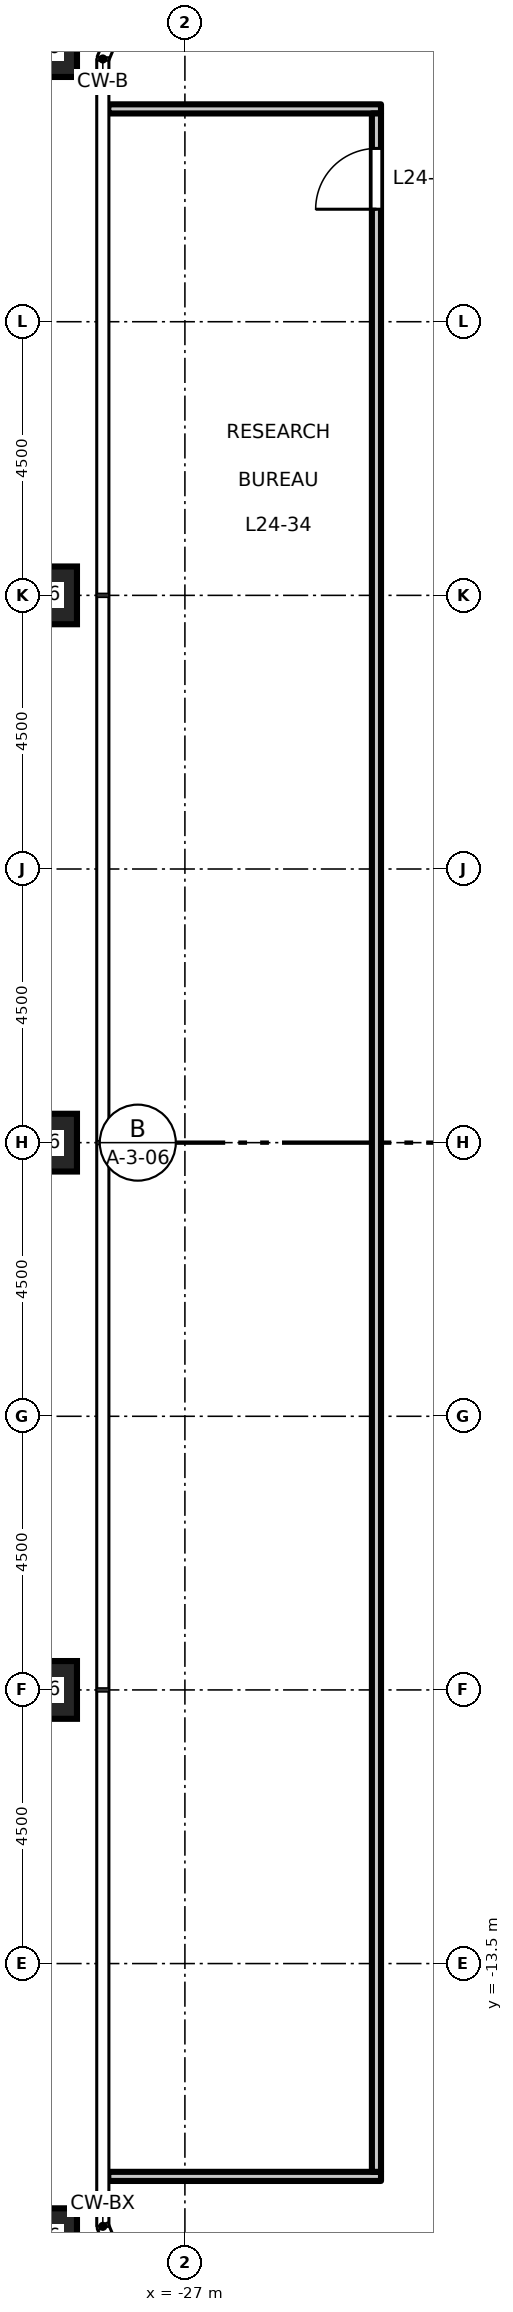
"""IFC4 building model, lengths in metres.
Left out: names, types, materials, properties, quantities, classifications, styles, units other than length and angle.
Written with IfcOpenShell. Run it as: python <this file> out.ifc"""

import sys

from ifc_helpers import new_model, si_unit, direction, frame, frame_2d, origin, origin_2d, place, context, subcontext, project, spatial, rectangle, hollow_rectangle, extrude, element, fill, save


model = new_model("IFC4")
c1 = context("Model", 3, precision=1e-05, world=origin(), true_north=direction((0.0, 1.0)))
c2 = subcontext(c1, "Body", "Model", "MODEL_VIEW")
j1 = project(units=[si_unit("LENGTHUNIT", "METRE"), si_unit("PLANEANGLEUNIT", "RADIAN")], contexts=[c1])
p1 = place(None, origin())
s1 = spatial("IfcSite", under=j1, at=p1, CompositionType="ELEMENT")
p2 = place(p1, origin())
s2 = spatial("IfcBuilding", under=s1, at=p2, CompositionType="ELEMENT")
p3 = place(p2, frame((0.0, 0.0, 113.7)))
s3 = spatial("IfcBuildingStorey", under=s2, at=p3, CompositionType="ELEMENT", Elevation=113.7)
for number, where, z_axis, x_axis in (
    (1, (-29.25, 18.0, 0.0), (0.0, 0.0, 1.0), (1.0, 0.0, 0.0)),
    (2, (-29.25, 9.0, 0.0), (0.0, 0.0, 1.0), (1.0, 0.0, 0.0)),
    (3, (-29.25, 0.0, 0.0), (0.0, 0.0, 1.0), (1.0, 0.0, 0.0)),
    (4, (-29.25, -9.0, 0.0), (0.0, 0.0, 1.0), (1.0, 0.0, 0.0)),
    (5, (-29.25, -18.0, 0.0), (0.0, 0.0, 1.0), (1.0, 0.0, 0.0)),
):
    element("IfcColumn", number, at=place(p3, frame(where, z_axis=z_axis, x_axis=x_axis)), inside=s3, PredefinedType="COLUMN", context=c2, shape_type="SweptSolid", body=[
        extrude(hollow_rectangle(XDim=0.95, YDim=0.95, WallThickness=0.055, at=origin_2d()), origin(), (0.0, 0.0, 1.0), 4.5),
    ])
for number, where, z_axis, x_axis in (
    (6, (-28.26, -17.0, 0.0), (0.0, 0.0, 1.0), (1.0, 0.0, 0.0)),
    (7, (-28.26, 17.0, 0.0), (0.0, 0.0, 1.0), (1.0, 0.0, 0.0)),
):
    element("IfcWall", number, at=place(p3, frame(where, z_axis=z_axis, x_axis=x_axis)), inside=s3, PredefinedType="PARTITIONING", context=c2, shape_type="SweptSolid", body=[
        extrude(rectangle(XDim=4.485, YDim=0.15, at=frame_2d((2.243, 0.0))), origin(), (0.0, 0.0, 1.0), 4.35),
    ])
p4 = place(p3, frame((-23.85, -16.925, 0.0), z_axis=(0.0, 0.0, 1.0), x_axis=(0.0, 1.0, 0.0)))
e8 = element("IfcWall", 8, at=p4, inside=s3, PredefinedType="PARTITIONING", context=c2, shape_type="SweptSolid", body=[
    extrude(rectangle(XDim=33.85, YDim=0.15, at=frame_2d((16.925, 0.0))), origin(), (0.0, 0.0, 1.0), 4.35),
])
p5 = place(p4, frame((32.275, 0.0, 0.0)))
e9 = element("IfcOpeningElement", 9, at=p5, cuts=e8, PredefinedType="OPENING", context=c2, shape_type="SweptSolid", body=[
    extrude(rectangle(XDim=1.0, YDim=2.1, at=frame_2d((0.5, 1.05))), frame((0.0, 0.085, 0.0), z_axis=(0.0, -1.0, 0.0), x_axis=(1.0, 0.0, 0.0)), (0.0, 0.0, 1.0), 0.17),
])
p6 = place(p5, origin())
e10 = element("IfcDoor", 10, at=p6, inside=s3, OperationType="SINGLE_SWING_LEFT", PredefinedType="DOOR", context=c2, shape_type="SweptSolid", body=[
    extrude(rectangle(XDim=1.0, YDim=2.1, at=frame_2d((0.5, 1.05))), frame((0.0, 0.025, 0.0), z_axis=(0.0, -1.0, 0.0), x_axis=(1.0, 0.0, 0.0)), (0.0, 0.0, 1.0), 0.05),
])
fill(e9, e10)
save(model, sys.argv[1])
